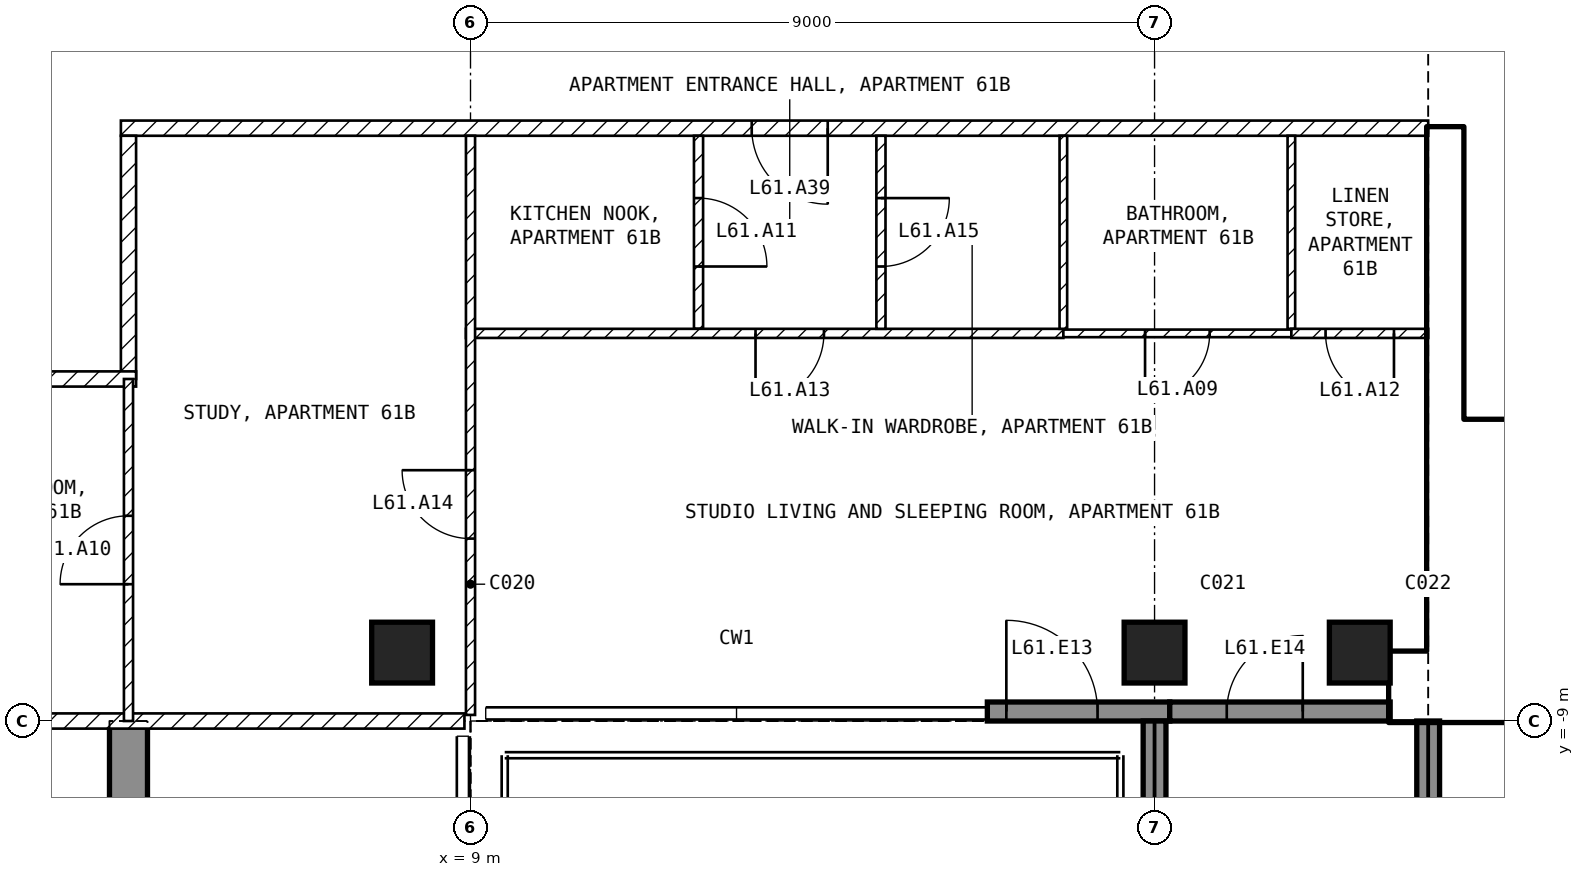
"""IFC4 building model, lengths in metres.
Left out: names, types, materials, properties, quantities, classifications, styles, units other than length and angle.
Written with IfcOpenShell. Run it as: python <this file> out.ifc"""

import sys

from ifc_helpers import new_model, si_unit, direction, frame, frame_2d, origin, origin_2d, place, context, subcontext, project, spatial, polyline, rectangle, outline, extrude, element, fill, save


model = new_model("IFC4")
c1 = context("Model", 3, precision=1e-05, world=origin(), true_north=direction((0.0, 1.0)))
c2 = subcontext(c1, "Body", "Model", "MODEL_VIEW")
j1 = project(units=[si_unit("LENGTHUNIT", "METRE"), si_unit("PLANEANGLEUNIT", "RADIAN")], contexts=[c1])
p1 = place(None, origin())
s1 = spatial("IfcSite", under=j1, at=p1, CompositionType="ELEMENT")
p2 = place(p1, origin())
s2 = spatial("IfcBuilding", under=s1, at=p2, CompositionType="ELEMENT")
p3 = place(p2, frame((0.0, 0.0, 243.0)))
s3 = spatial("IfcBuildingStorey", under=s2, at=p3, CompositionType="ELEMENT", Elevation=243.0)
for number, where, z_axis, x_axis in (
    (1, (8.1, -8.1, -0.25), (0.0, 0.0, 1.0), (1.0, 0.0, 0.0)),
    (2, (18.0, -8.1, -0.25), (0.0, 0.0, 1.0), (1.0, 0.0, 0.0)),
    (3, (20.7, -8.1, -0.25), (0.0, 0.0, 1.0), (1.0, 0.0, 0.0)),
):
    element("IfcColumn", number, at=place(p3, frame(where, z_axis=z_axis, x_axis=x_axis)), inside=s3, PredefinedType="COLUMN", context=c2, shape_type="SweptSolid", body=[
        extrude(rectangle(XDim=0.8, YDim=0.8, at=origin_2d()), origin(), (0.0, 0.0, 1.0), 3.5),
    ])
p4 = place(p3, frame((4.25, -16.7, -0.25), z_axis=(1.0, 0.0, 0.0), x_axis=(0.0, 1.0, 0.0)))
e4 = element("IfcWall", 4, at=p4, inside=s3, PredefinedType="SHEAR", context=c2, shape_type="SweptSolid", body=[
    extrude(outline(polyline([(0.0, 0.0), (3.2, 0.0), (3.2, 2.65), (5.6, 2.65), (5.6, 0.0), (7.7, 0.0), (7.7, 3.5), (0.0, 3.5), (0.0, 0.0)])), origin(), (0.0, 0.0, 1.0), 0.5),
])
p5 = place(p3, frame((15.8, -8.875, 0.0), z_axis=(0.0, 0.0, 1.0), x_axis=(1.0, 0.0, 0.0)))
e5 = element("IfcWall", 5, at=p5, inside=s3, PredefinedType="SOLIDWALL", context=c2, shape_type="SweptSolid", body=[
    extrude(rectangle(XDim=2.4, YDim=0.25, at=frame_2d((1.2, 0.0))), origin(), (0.0, 0.0, 1.0), 3.25),
])
p6 = place(p5, frame((0.25, 0.0, 0.0)))
e6 = element("IfcOpeningElement", 6, at=p6, cuts=e5, PredefinedType="OPENING", context=c2, shape_type="SweptSolid", body=[
    extrude(rectangle(XDim=1.2, YDim=2.4, at=frame_2d((0.6, 1.2))), frame((0.0, 0.135, 0.0), z_axis=(0.0, -1.0, 0.0), x_axis=(1.0, 0.0, 0.0)), (0.0, 0.0, 1.0), 0.27),
])
p7 = place(p3, frame((18.2, -8.875, 0.0), z_axis=(0.0, 0.0, 1.0), x_axis=(1.0, 0.0, 0.0)))
e7 = element("IfcWall", 7, at=p7, inside=s3, PredefinedType="SOLIDWALL", context=c2, shape_type="SweptSolid", body=[
    extrude(rectangle(XDim=2.9, YDim=0.25, at=frame_2d((1.45, 0.0))), origin(), (0.0, 0.0, 1.0), 3.25),
])
p8 = place(p7, frame((0.75, 0.0, 0.0)))
e8 = element("IfcOpeningElement", 8, at=p8, cuts=e7, PredefinedType="OPENING", context=c2, shape_type="SweptSolid", body=[
    extrude(rectangle(XDim=1.0, YDim=2.4, at=frame_2d((0.5, 1.2))), frame((0.0, 0.135, 0.0), z_axis=(0.0, -1.0, 0.0), x_axis=(1.0, 0.0, 0.0)), (0.0, 0.0, 1.0), 0.27),
])
p9 = place(p3, frame((18.0, -9.0, 0.0), z_axis=(0.0, 0.0, 1.0), x_axis=(0.0, -1.0, 0.0)))
e9 = element("IfcWall", 9, at=p9, inside=s3, PredefinedType="SOLIDWALL", context=c2, shape_type="SweptSolid", body=[
    extrude(rectangle(XDim=2.74, YDim=0.3, at=frame_2d((1.37, 0.0))), origin(), (0.0, 0.0, 1.0), 3.25),
])
p10 = place(p3, frame((21.6, -9.0, 0.0), z_axis=(0.0, 0.0, 1.0), x_axis=(0.0, -1.0, 0.0)))
e10 = element("IfcWall", 10, at=p10, inside=s3, PredefinedType="SOLIDWALL", context=c2, shape_type="SweptSolid", body=[
    extrude(rectangle(XDim=2.7, YDim=0.3, at=frame_2d((1.35, 0.0))), origin(), (0.0, 0.0, 1.0), 3.25),
])
p11 = place(p3, frame((21.1, -8.55, 0.0), z_axis=(0.0, 0.0, 1.0), x_axis=(1.0, 0.0, 0.0)))
e11 = element("IfcWall", 11, at=p11, inside=s3, PredefinedType="SHEAR", context=c2, shape_type="SweptSolid", body=[
    extrude(rectangle(XDim=9.1, YDim=0.9, at=frame_2d((4.55, 0.0))), origin(), (0.0, 0.0, 1.0), 3.25),
])
p12 = place(p3, frame((21.825, -8.1, 0.0), z_axis=(0.0, 0.0, 1.0), x_axis=(0.0, 1.0, 0.0)))
e12 = element("IfcWall", 12, at=p12, inside=s3, PredefinedType="SHEAR", context=c2, shape_type="SweptSolid", body=[
    extrude(rectangle(XDim=6.9, YDim=0.45, at=frame_2d((3.45, 0.0))), origin(), (0.0, 0.0, 1.0), 3.25),
])
p13 = place(p3, frame((22.05, -5.15, 0.0), z_axis=(0.0, 0.0, 1.0), x_axis=(1.0, 0.0, 0.0)))
e13 = element("IfcWall", 13, at=p13, inside=s3, PredefinedType="SOLIDWALL", context=c2, shape_type="SweptSolid", body=[
    extrude(rectangle(XDim=6.3, YDim=0.2, at=frame_2d((3.15, 0.0))), origin(), (0.0, 0.0, 1.0), 3.25),
])
p14 = place(p13, frame((0.2, 0.0, 0.0)))
e14 = element("IfcOpeningElement", 14, at=p14, cuts=e13, PredefinedType="OPENING", context=c2, shape_type="SweptSolid", body=[
    extrude(rectangle(XDim=1.0, YDim=2.1, at=frame_2d((0.5, 1.05))), frame((0.0, 0.11, 0.0), z_axis=(0.0, -1.0, 0.0), x_axis=(1.0, 0.0, 0.0)), (0.0, 0.0, 1.0), 0.22),
])
p15 = place(p3, frame((21.6, -1.2, 0.0), z_axis=(0.0, 0.0, 1.0), x_axis=(-1.0, 0.0, 0.0)))
e15 = element("IfcWall", 15, at=p15, inside=s3, PredefinedType="PARTITIONING", context=c2, shape_type="SweptSolid", body=[
    extrude(rectangle(XDim=17.2, YDim=0.2, at=frame_2d((8.6, 0.0))), origin(), (0.0, 0.0, 1.0), 3.25),
])
p16 = place(p15, frame((7.9, 0.0, 0.0)))
e16 = element("IfcOpeningElement", 16, at=p16, cuts=e15, PredefinedType="OPENING", context=c2, shape_type="SweptSolid", body=[
    extrude(rectangle(XDim=1.0, YDim=2.1, at=frame_2d((0.5, 1.05))), frame((0.0, 0.11, 0.0), z_axis=(0.0, -1.0, 0.0), x_axis=(1.0, 0.0, 0.0)), (0.0, 0.0, 1.0), 0.22),
])
p17 = place(p3, frame((4.5, -1.3, 0.0), z_axis=(0.0, 0.0, 1.0), x_axis=(0.0, -1.0, 0.0)))
e17 = element("IfcWall", 17, at=p17, inside=s3, PredefinedType="PARTITIONING", context=c2, shape_type="SweptSolid", body=[
    extrude(rectangle(XDim=3.2, YDim=0.2, at=frame_2d((1.6, 0.0))), origin(), (0.0, 0.0, 1.0), 3.25),
])
p18 = place(p3, frame((4.6, -4.5, 0.0), z_axis=(0.0, 0.0, 1.0), x_axis=(-1.0, 0.0, 0.0)))
e18 = element("IfcWall", 18, at=p18, inside=s3, PredefinedType="PARTITIONING", context=c2, shape_type="SweptSolid", body=[
    extrude(rectangle(XDim=3.5, YDim=0.2, at=frame_2d((1.75, 0.0))), origin(), (0.0, 0.0, 1.0), 3.25),
])
p19 = place(p3, frame((8.92, -9.0, 0.0), z_axis=(0.0, 0.0, 1.0), x_axis=(-1.0, 0.0, 0.0)))
e19 = element("IfcWall", 19, at=p19, inside=s3, PredefinedType="PARTITIONING", context=c2, shape_type="SweptSolid", body=[
    extrude(rectangle(XDim=17.84, YDim=0.2, at=frame_2d((8.92, 0.0))), origin(), (0.0, 0.0, 1.0), 3.25),
])
p20 = place(p19, frame((8.42, 0.0, 0.0)))
e20 = element("IfcOpeningElement", 20, at=p20, cuts=e19, PredefinedType="OPENING", context=c2, shape_type="SweptSolid", body=[
    extrude(rectangle(XDim=1.0, YDim=2.1, at=frame_2d((0.5, 1.05))), frame((0.0, 0.11, 0.0), z_axis=(0.0, -1.0, 0.0), x_axis=(1.0, 0.0, 0.0)), (0.0, 0.0, 1.0), 0.22),
])
p21 = place(p3, frame((12.0, -1.3, 0.0), z_axis=(0.0, 0.0, 1.0), x_axis=(0.0, -1.0, 0.0)))
e21 = element("IfcWall", 21, at=p21, inside=s3, PredefinedType="PARTITIONING", context=c2, shape_type="SweptSolid", body=[
    extrude(rectangle(XDim=2.54, YDim=0.12, at=frame_2d((1.27, 0.0))), origin(), (0.0, 0.0, 1.0), 3.25),
])
p22 = place(p21, frame((0.82, 0.0, 0.0)))
e22 = element("IfcOpeningElement", 22, at=p22, cuts=e21, PredefinedType="OPENING", context=c2, shape_type="SweptSolid", body=[
    extrude(rectangle(XDim=0.9, YDim=2.1, at=frame_2d((0.45, 1.05))), frame((0.0, 0.07, 0.0), z_axis=(0.0, -1.0, 0.0), x_axis=(1.0, 0.0, 0.0)), (0.0, 0.0, 1.0), 0.14),
])
p23 = place(p3, frame((16.8, -3.9, 0.0), z_axis=(0.0, 0.0, 1.0), x_axis=(-1.0, 0.0, 0.0)))
e23 = element("IfcWall", 23, at=p23, inside=s3, PredefinedType="PARTITIONING", context=c2, shape_type="SweptSolid", body=[
    extrude(rectangle(XDim=7.86, YDim=0.12, at=frame_2d((3.93, 0.0))), origin(), (0.0, 0.0, 1.0), 3.25),
])
p24 = place(p23, frame((3.15, 0.0, 0.0)))
e24 = element("IfcOpeningElement", 24, at=p24, cuts=e23, PredefinedType="OPENING", context=c2, shape_type="SweptSolid", body=[
    extrude(rectangle(XDim=0.9, YDim=2.1, at=frame_2d((0.45, 1.05))), frame((0.0, 0.07, 0.0), z_axis=(0.0, -1.0, 0.0), x_axis=(1.0, 0.0, 0.0)), (0.0, 0.0, 1.0), 0.14),
])
p25 = place(p3, frame((9.0, -8.92, 0.0), z_axis=(0.0, 0.0, 1.0), x_axis=(0.0, 1.0, 0.0)))
e25 = element("IfcWall", 25, at=p25, inside=s3, PredefinedType="PARTITIONING", context=c2, shape_type="SweptSolid", body=[
    extrude(rectangle(XDim=7.62, YDim=0.12, at=frame_2d((3.81, 0.0))), origin(), (0.0, 0.0, 1.0), 3.25),
])
p26 = place(p25, frame((2.32, 0.0, 0.0)))
e26 = element("IfcOpeningElement", 26, at=p26, cuts=e25, PredefinedType="OPENING", context=c2, shape_type="SweptSolid", body=[
    extrude(rectangle(XDim=0.9, YDim=2.1, at=frame_2d((0.45, 1.05))), frame((0.0, 0.07, 0.0), z_axis=(0.0, -1.0, 0.0), x_axis=(1.0, 0.0, 0.0)), (0.0, 0.0, 1.0), 0.14),
])
p27 = place(p3, frame((14.4, -1.3, 0.0), z_axis=(0.0, 0.0, 1.0), x_axis=(0.0, -1.0, 0.0)))
e27 = element("IfcWall", 27, at=p27, inside=s3, PredefinedType="PARTITIONING", context=c2, shape_type="SweptSolid", body=[
    extrude(rectangle(XDim=2.54, YDim=0.12, at=frame_2d((1.27, 0.0))), origin(), (0.0, 0.0, 1.0), 3.25),
])
p28 = place(p27, frame((0.82, 0.0, 0.0)))
e28 = element("IfcOpeningElement", 28, at=p28, cuts=e27, PredefinedType="OPENING", context=c2, shape_type="SweptSolid", body=[
    extrude(rectangle(XDim=0.9, YDim=2.1, at=frame_2d((0.45, 1.05))), frame((0.0, 0.07, 0.0), z_axis=(0.0, -1.0, 0.0), x_axis=(1.0, 0.0, 0.0)), (0.0, 0.0, 1.0), 0.14),
])
for number, where, z_axis, x_axis in (
    (29, (16.8, -1.3, 0.0), (0.0, 0.0, 1.0), (0.0, -1.0, 0.0)),
    (30, (19.8, -1.3, 0.0), (0.0, 0.0, 1.0), (0.0, -1.0, 0.0)),
):
    element("IfcWall", number, at=place(p3, frame(where, z_axis=z_axis, x_axis=x_axis)), inside=s3, PredefinedType="PARTITIONING", context=c2, shape_type="SweptSolid", body=[
        extrude(rectangle(XDim=2.54, YDim=0.1, at=frame_2d((1.27, 0.0))), origin(), (0.0, 0.0, 1.0), 3.25),
    ])
p29 = place(p3, frame((19.8, -3.9, 0.0), z_axis=(0.0, 0.0, 1.0), x_axis=(-1.0, 0.0, 0.0)))
e31 = element("IfcWall", 31, at=p29, inside=s3, PredefinedType="PARTITIONING", context=c2, shape_type="SweptSolid", body=[
    extrude(rectangle(XDim=3.0, YDim=0.1, at=frame_2d((1.5, 0.0))), origin(), (0.0, 0.0, 1.0), 3.25),
])
p30 = place(p29, frame((1.075, 0.0, 0.0)))
e32 = element("IfcOpeningElement", 32, at=p30, cuts=e31, PredefinedType="OPENING", context=c2, shape_type="SweptSolid", body=[
    extrude(rectangle(XDim=0.85, YDim=2.1, at=frame_2d((0.425, 1.05))), frame((0.0, 0.06, 0.0), z_axis=(0.0, -1.0, 0.0), x_axis=(1.0, 0.0, 0.0)), (0.0, 0.0, 1.0), 0.12),
])
p31 = place(p3, frame((21.6, -3.9, 0.0), z_axis=(0.0, 0.0, 1.0), x_axis=(-1.0, 0.0, 0.0)))
e33 = element("IfcWall", 33, at=p31, inside=s3, PredefinedType="PARTITIONING", context=c2, shape_type="SweptSolid", body=[
    extrude(rectangle(XDim=1.8, YDim=0.12, at=frame_2d((0.9, 0.0))), origin(), (0.0, 0.0, 1.0), 3.25),
])
p32 = place(p31, frame((0.45, 0.0, 0.0)))
e34 = element("IfcOpeningElement", 34, at=p32, cuts=e33, PredefinedType="OPENING", context=c2, shape_type="SweptSolid", body=[
    extrude(rectangle(XDim=0.9, YDim=2.1, at=frame_2d((0.45, 1.05))), frame((0.0, 0.07, 0.0), z_axis=(0.0, -1.0, 0.0), x_axis=(1.0, 0.0, 0.0)), (0.0, 0.0, 1.0), 0.14),
])
p33 = place(p3, frame((4.5, -9.0, 0.0), z_axis=(0.0, 0.0, 1.0), x_axis=(0.0, 1.0, 0.0)))
e35 = element("IfcWall", 35, at=p33, inside=s3, PredefinedType="PARTITIONING", context=c2, shape_type="SweptSolid", body=[
    extrude(rectangle(XDim=4.5, YDim=0.12, at=frame_2d((2.25, 0.0))), origin(), (0.0, 0.0, 1.0), 3.25),
])
p34 = place(p33, frame((1.8, 0.0, 0.0)))
e36 = element("IfcOpeningElement", 36, at=p34, cuts=e35, PredefinedType="OPENING", context=c2, shape_type="SweptSolid", body=[
    extrude(rectangle(XDim=0.9, YDim=2.1, at=frame_2d((0.45, 1.05))), frame((0.0, 0.07, 0.0), z_axis=(0.0, -1.0, 0.0), x_axis=(1.0, 0.0, 0.0)), (0.0, 0.0, 1.0), 0.14),
])
p35 = place(p6, origin())
e37 = element("IfcDoor", 37, at=p35, inside=s3, OperationType="SINGLE_SWING_LEFT", PredefinedType="DOOR", context=c2, shape_type="SweptSolid", body=[
    extrude(rectangle(XDim=1.2, YDim=2.4, at=frame_2d((0.6, 1.2))), frame((0.0, 0.025, 0.0), z_axis=(0.0, -1.0, 0.0), x_axis=(1.0, 0.0, 0.0)), (0.0, 0.0, 1.0), 0.05),
])
fill(e6, e37)
p36 = place(p8, origin())
e38 = element("IfcDoor", 38, at=p36, inside=s3, OperationType="SINGLE_SWING_RIGHT", PredefinedType="DOOR", context=c2, shape_type="SweptSolid", body=[
    extrude(rectangle(XDim=1.0, YDim=2.4, at=frame_2d((0.5, 1.2))), frame((0.0, 0.025, 0.0), z_axis=(0.0, -1.0, 0.0), x_axis=(1.0, 0.0, 0.0)), (0.0, 0.0, 1.0), 0.05),
])
fill(e8, e38)
p37 = place(p14, origin())
e39 = element("IfcDoor", 39, at=p37, inside=s3, OperationType="SINGLE_SWING_LEFT", PredefinedType="DOOR", context=c2, shape_type="SweptSolid", body=[
    extrude(rectangle(XDim=1.0, YDim=2.1, at=frame_2d((0.5, 1.05))), frame((0.0, 0.025, 0.0), z_axis=(0.0, -1.0, 0.0), x_axis=(1.0, 0.0, 0.0)), (0.0, 0.0, 1.0), 0.05),
])
fill(e14, e39)
p38 = place(p30, origin())
e40 = element("IfcDoor", 40, at=p38, inside=s3, OperationType="SINGLE_SWING_RIGHT", PredefinedType="DOOR", context=c2, shape_type="SweptSolid", body=[
    extrude(rectangle(XDim=0.85, YDim=2.1, at=frame_2d((0.425, 1.05))), frame((0.0, 0.025, 0.0), z_axis=(0.0, -1.0, 0.0), x_axis=(1.0, 0.0, 0.0)), (0.0, 0.0, 1.0), 0.05),
])
fill(e32, e40)
p39 = place(p34, origin())
e41 = element("IfcDoor", 41, at=p39, inside=s3, OperationType="SINGLE_SWING_LEFT", PredefinedType="DOOR", context=c2, shape_type="SweptSolid", body=[
    extrude(rectangle(XDim=0.9, YDim=2.1, at=frame_2d((0.45, 1.05))), frame((0.0, 0.025, 0.0), z_axis=(0.0, -1.0, 0.0), x_axis=(1.0, 0.0, 0.0)), (0.0, 0.0, 1.0), 0.05),
])
fill(e36, e41)
p40 = place(p22, origin())
e42 = element("IfcDoor", 42, at=p40, inside=s3, OperationType="SINGLE_SWING_RIGHT", PredefinedType="DOOR", context=c2, shape_type="SweptSolid", body=[
    extrude(rectangle(XDim=0.9, YDim=2.1, at=frame_2d((0.45, 1.05))), frame((0.0, 0.025, 0.0), z_axis=(0.0, -1.0, 0.0), x_axis=(1.0, 0.0, 0.0)), (0.0, 0.0, 1.0), 0.05),
])
fill(e22, e42)
p41 = place(p32, origin())
e43 = element("IfcDoor", 43, at=p41, inside=s3, OperationType="SINGLE_SWING_LEFT", PredefinedType="DOOR", context=c2, shape_type="SweptSolid", body=[
    extrude(rectangle(XDim=0.9, YDim=2.1, at=frame_2d((0.45, 1.05))), frame((0.0, 0.025, 0.0), z_axis=(0.0, -1.0, 0.0), x_axis=(1.0, 0.0, 0.0)), (0.0, 0.0, 1.0), 0.05),
])
fill(e34, e43)
p42 = place(p24, origin())
e44 = element("IfcDoor", 44, at=p42, inside=s3, OperationType="SINGLE_SWING_RIGHT", PredefinedType="DOOR", context=c2, shape_type="SweptSolid", body=[
    extrude(rectangle(XDim=0.9, YDim=2.1, at=frame_2d((0.45, 1.05))), frame((0.0, 0.025, 0.0), z_axis=(0.0, -1.0, 0.0), x_axis=(1.0, 0.0, 0.0)), (0.0, 0.0, 1.0), 0.05),
])
fill(e24, e44)
p43 = place(p26, origin())
e45 = element("IfcDoor", 45, at=p43, inside=s3, OperationType="SINGLE_SWING_RIGHT", PredefinedType="DOOR", context=c2, shape_type="SweptSolid", body=[
    extrude(rectangle(XDim=0.9, YDim=2.1, at=frame_2d((0.45, 1.05))), frame((0.0, 0.025, 0.0), z_axis=(0.0, -1.0, 0.0), x_axis=(1.0, 0.0, 0.0)), (0.0, 0.0, 1.0), 0.05),
])
fill(e26, e45)
p44 = place(p28, origin())
e46 = element("IfcDoor", 46, at=p44, inside=s3, OperationType="SINGLE_SWING_LEFT", PredefinedType="DOOR", context=c2, shape_type="SweptSolid", body=[
    extrude(rectangle(XDim=0.9, YDim=2.1, at=frame_2d((0.45, 1.05))), frame((0.0, 0.025, 0.0), z_axis=(0.0, -1.0, 0.0), x_axis=(1.0, 0.0, 0.0)), (0.0, 0.0, 1.0), 0.05),
])
fill(e28, e46)
p45 = place(p16, origin())
e47 = element("IfcDoor", 47, at=p45, inside=s3, OperationType="SINGLE_SWING_LEFT", PredefinedType="DOOR", context=c2, shape_type="SweptSolid", body=[
    extrude(rectangle(XDim=1.0, YDim=2.1, at=frame_2d((0.5, 1.05))), frame((0.0, 0.025, 0.0), z_axis=(0.0, -1.0, 0.0), x_axis=(1.0, 0.0, 0.0)), (0.0, 0.0, 1.0), 0.05),
])
fill(e16, e47)
save(model, sys.argv[1])
